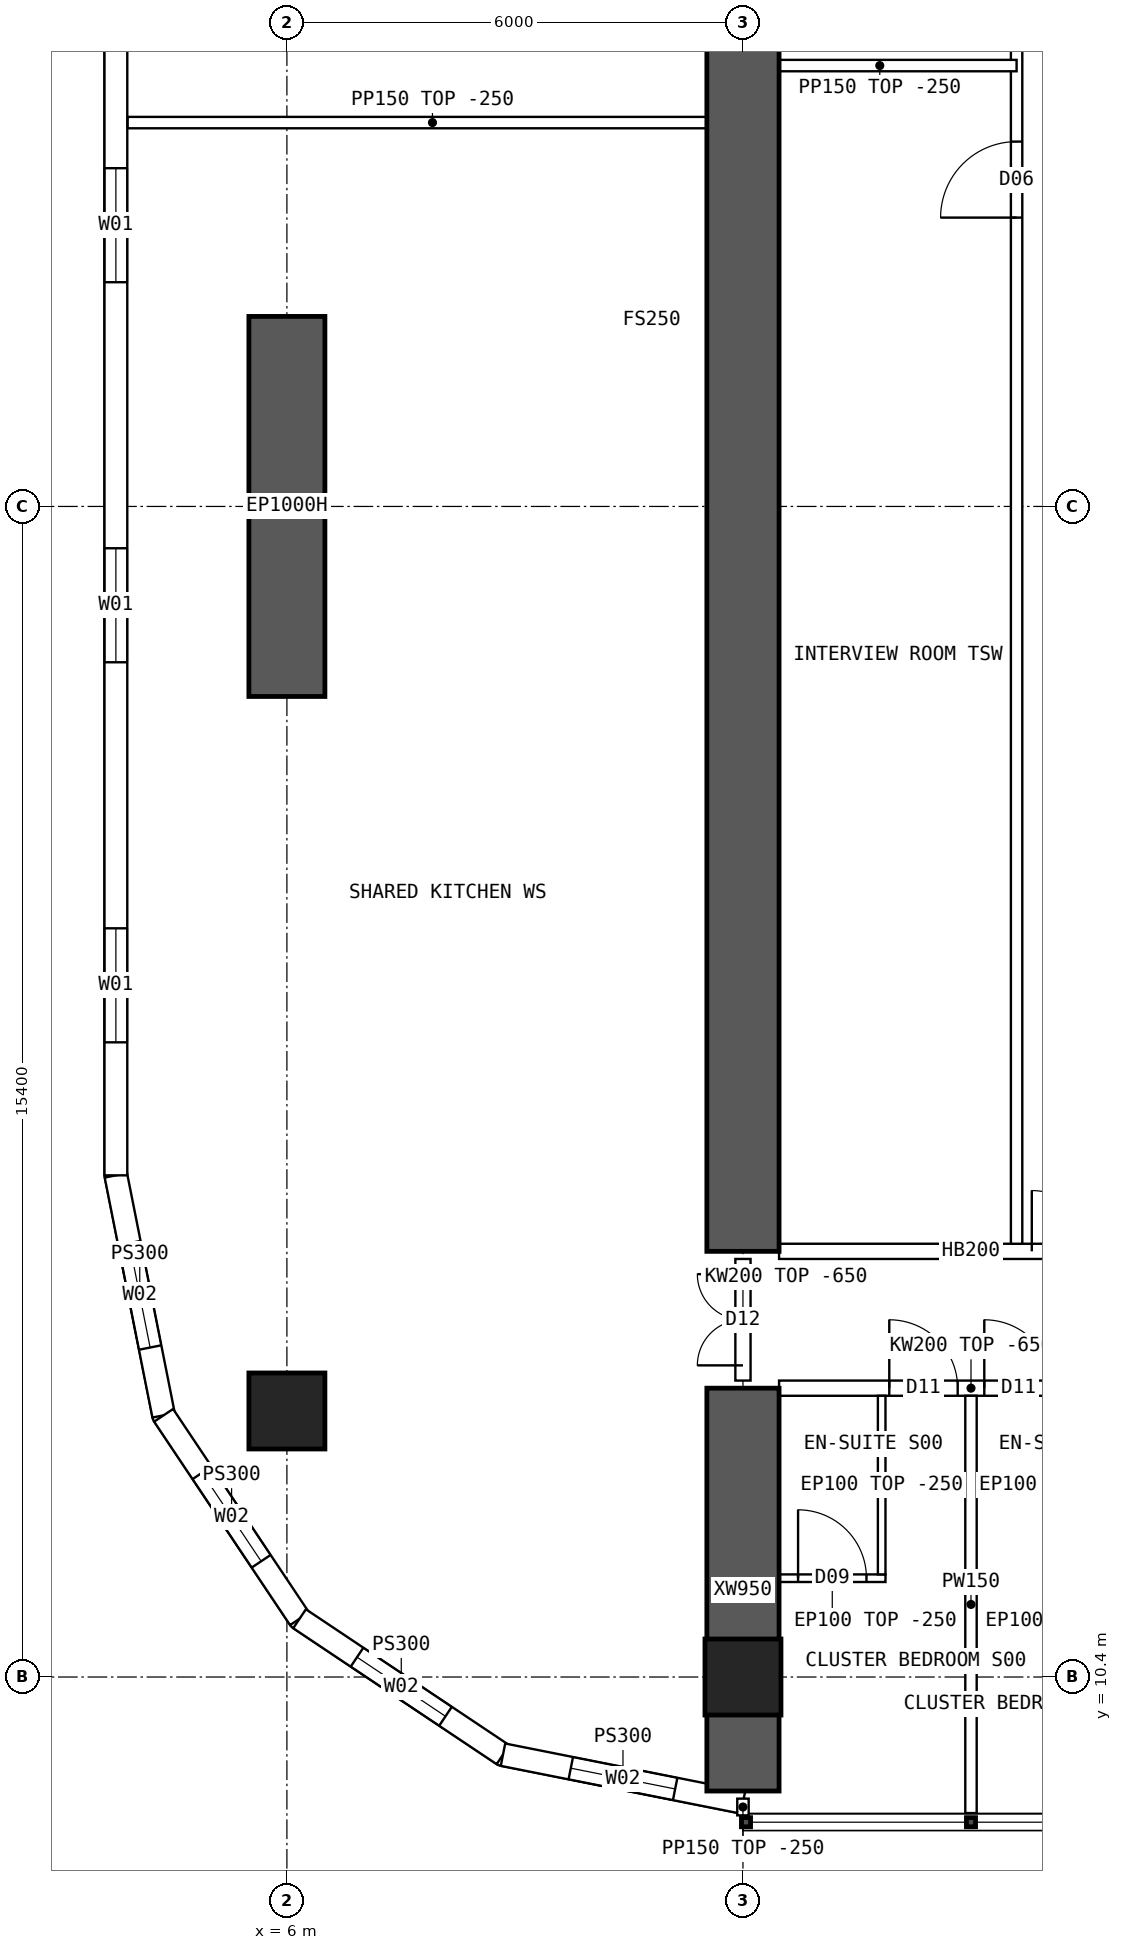
"""IFC4 building model, lengths in metres.
Left out: names, types, materials, properties, quantities, classifications, styles, units other than length and angle.
Written with IfcOpenShell. Run it as: python <this file> out.ifc"""

import sys

from ifc_helpers import new_model, si_unit, direction, frame, frame_2d, origin, origin_2d, place, context, subcontext, project, spatial, polyline, rectangle, hollow_rectangle, outline, extrude, element, fill, save


model = new_model("IFC4")
c1 = context("Model", 3, precision=1e-05, world=origin(), true_north=direction((0.0, 1.0)))
c2 = subcontext(c1, "Body", "Model", "MODEL_VIEW")
j1 = project(units=[si_unit("LENGTHUNIT", "METRE"), si_unit("PLANEANGLEUNIT", "RADIAN")], contexts=[c1])
p1 = place(None, origin())
s1 = spatial("IfcSite", under=j1, at=p1, CompositionType="ELEMENT")
p2 = place(p1, origin())
s2 = spatial("IfcBuilding", under=s1, at=p2, CompositionType="ELEMENT")
p3 = place(p2, frame((0.0, 0.0, 88.15)))
s3 = spatial("IfcBuildingStorey", under=s2, at=p3, CompositionType="ELEMENT", Elevation=88.15)
for number, where, z_axis, x_axis in (
    (1, (12.0, 10.4, 0.0), (0.0, 0.0, 1.0), (1.0, 0.0, 0.0)),
    (2, (6.0, 13.9, 0.0), (0.0, 0.0, 1.0), (1.0, 0.0, 0.0)),
):
    element("IfcColumn", number, at=place(p3, frame(where, z_axis=z_axis, x_axis=x_axis)), inside=s3, PredefinedType="COLUMN", context=c2, shape_type="SweptSolid", body=[
        extrude(hollow_rectangle(XDim=1.0, YDim=1.0, WallThickness=0.1, at=origin_2d()), origin(), (0.0, 0.0, 1.0), 3.75),
    ])
p4 = place(p3, frame((6.0, 23.3, 0.0), z_axis=(0.0, 0.0, 1.0), x_axis=(0.0, 1.0, 0.0)))
e3 = element("IfcWall", 3, at=p4, inside=s3, PredefinedType="SHEAR", context=c2, shape_type="SweptSolid", body=[
    extrude(rectangle(XDim=5.0, YDim=1.0, at=frame_2d((2.5, 0.0))), origin(), (0.0, 0.0, 1.0), 3.75),
])
p5 = place(p3, frame((12.0, 8.9, 0.0), z_axis=(0.0, 0.0, 1.0), x_axis=(0.0, 1.0, 0.0)))
e4 = element("IfcWall", 4, at=p5, inside=s3, PredefinedType="SHEAR", context=c2, shape_type="SweptSolid", body=[
    extrude(rectangle(XDim=5.3, YDim=0.95, at=frame_2d((2.65, 0.0))), origin(), (0.0, 0.0, 1.0), 3.75),
])
p6 = place(p3, frame((12.0, 16.0, 0.0), z_axis=(0.0, 0.0, 1.0), x_axis=(0.0, 1.0, 0.0)))
e5 = element("IfcWall", 5, at=p6, inside=s3, PredefinedType="SHEAR", context=c2, shape_type="SweptSolid", body=[
    extrude(rectangle(XDim=32.0, YDim=0.95, at=frame_2d((16.0, 0.0))), origin(), (0.0, 0.0, 1.0), 3.75),
])
p7 = place(p3, frame((3.75, 47.0, 0.0), z_axis=(0.0, 0.0, 1.0), x_axis=(0.0, -1.0, 0.0)))
e6 = element("IfcWall", 6, at=p7, inside=s3, PredefinedType="SOLIDWALL", context=c2, shape_type="SweptSolid", body=[
    extrude(outline(polyline([(-0.015, -0.15), (30.015, -0.15), (29.985, 0.15), (0.015, 0.15), (-0.015, -0.15)])), origin(), (0.0, 0.0, 1.0), 3.5),
])
p8 = place(p7, frame((1.75, 0.0, 0.9)))
e7 = element("IfcOpeningElement", 7, at=p8, cuts=e6, PredefinedType="OPENING", context=c2, shape_type="SweptSolid", body=[
    extrude(rectangle(XDim=1.5, YDim=2.0, at=frame_2d((0.75, 1.0))), frame((0.0, 0.16, 0.0), z_axis=(0.0, -1.0, 0.0), x_axis=(1.0, 0.0, 0.0)), (0.0, 0.0, 1.0), 0.32),
])
p9 = place(p7, frame((6.75, 0.0, 0.9)))
e8 = element("IfcOpeningElement", 8, at=p9, cuts=e6, PredefinedType="OPENING", context=c2, shape_type="SweptSolid", body=[
    extrude(rectangle(XDim=1.5, YDim=2.0, at=frame_2d((0.75, 1.0))), frame((0.0, 0.16, 0.0), z_axis=(0.0, -1.0, 0.0), x_axis=(1.0, 0.0, 0.0)), (0.0, 0.0, 1.0), 0.32),
])
p10 = place(p7, frame((11.75, 0.0, 0.9)))
e9 = element("IfcOpeningElement", 9, at=p10, cuts=e6, PredefinedType="OPENING", context=c2, shape_type="SweptSolid", body=[
    extrude(rectangle(XDim=1.5, YDim=2.0, at=frame_2d((0.75, 1.0))), frame((0.0, 0.16, 0.0), z_axis=(0.0, -1.0, 0.0), x_axis=(1.0, 0.0, 0.0)), (0.0, 0.0, 1.0), 0.32),
])
p11 = place(p7, frame((16.75, 0.0, 0.9)))
e10 = element("IfcOpeningElement", 10, at=p11, cuts=e6, PredefinedType="OPENING", context=c2, shape_type="SweptSolid", body=[
    extrude(rectangle(XDim=1.5, YDim=2.0, at=frame_2d((0.75, 1.0))), frame((0.0, 0.16, 0.0), z_axis=(0.0, -1.0, 0.0), x_axis=(1.0, 0.0, 0.0)), (0.0, 0.0, 1.0), 0.32),
])
p12 = place(p7, frame((21.75, 0.0, 0.9)))
e11 = element("IfcOpeningElement", 11, at=p12, cuts=e6, PredefinedType="OPENING", context=c2, shape_type="SweptSolid", body=[
    extrude(rectangle(XDim=1.5, YDim=2.0, at=frame_2d((0.75, 1.0))), frame((0.0, 0.16, 0.0), z_axis=(0.0, -1.0, 0.0), x_axis=(1.0, 0.0, 0.0)), (0.0, 0.0, 1.0), 0.32),
])
p13 = place(p7, frame((26.75, 0.0, 0.9)))
e12 = element("IfcOpeningElement", 12, at=p13, cuts=e6, PredefinedType="OPENING", context=c2, shape_type="SweptSolid", body=[
    extrude(rectangle(XDim=1.5, YDim=2.0, at=frame_2d((0.75, 1.0))), frame((0.0, 0.16, 0.0), z_axis=(0.0, -1.0, 0.0), x_axis=(1.0, 0.0, 0.0)), (0.0, 0.0, 1.0), 0.32),
])
p14 = place(p3, frame((3.75, 17.0, 0.0), z_axis=(0.0, 0.0, 1.0), x_axis=(0.195080412259, -0.980787251524, 0.0)))
e13 = element("IfcWall", 13, at=p14, inside=s3, PredefinedType="SOLIDWALL", context=c2, shape_type="SweptSolid", body=[
    extrude(outline(polyline([(-0.015, -0.15), (3.249, -0.15), (3.189, 0.15), (0.015, 0.15), (-0.015, -0.15)])), origin(), (0.0, 0.0, 1.0), 3.5),
])
p15 = place(p14, frame((0.909, 0.0, 0.9)))
e14 = element("IfcOpeningElement", 14, at=p15, cuts=e13, PredefinedType="OPENING", context=c2, shape_type="SweptSolid", body=[
    extrude(rectangle(XDim=1.4, YDim=1.8, at=frame_2d((0.7, 0.9))), frame((0.0, 0.16, 0.0), z_axis=(0.0, -1.0, 0.0), x_axis=(1.0, 0.0, 0.0)), (0.0, 0.0, 1.0), 0.32),
])
p16 = place(p3, frame((4.378, 13.843, 0.0), z_axis=(0.0, 0.0, 1.0), x_axis=(0.555609954424, -0.831443069936, 0.0)))
e15 = element("IfcWall", 15, at=p16, inside=s3, PredefinedType="SOLIDWALL", context=c2, shape_type="SweptSolid", body=[
    extrude(outline(polyline([(-0.03, -0.15), (3.249, -0.15), (3.189, 0.15), (0.03, 0.15), (-0.03, -0.15)])), origin(), (0.0, 0.0, 1.0), 3.5),
])
p17 = place(p16, frame((0.909, 0.0, 0.9)))
e16 = element("IfcOpeningElement", 16, at=p17, cuts=e15, PredefinedType="OPENING", context=c2, shape_type="SweptSolid", body=[
    extrude(rectangle(XDim=1.4, YDim=1.8, at=frame_2d((0.7, 0.9))), frame((0.0, 0.16, 0.0), z_axis=(0.0, -1.0, 0.0), x_axis=(1.0, 0.0, 0.0)), (0.0, 0.0, 1.0), 0.32),
])
p18 = place(p3, frame((6.167, 11.167, 0.0), z_axis=(0.0, 0.0, 1.0), x_axis=(0.831443069936, -0.555609954424, 0.0)))
e17 = element("IfcWall", 17, at=p18, inside=s3, PredefinedType="SOLIDWALL", context=c2, shape_type="SweptSolid", body=[
    extrude(outline(polyline([(-0.03, -0.15), (3.249, -0.15), (3.189, 0.15), (0.03, 0.15), (-0.03, -0.15)])), origin(), (0.0, 0.0, 1.0), 3.5),
])
p19 = place(p18, frame((0.909, 0.0, 0.9)))
e18 = element("IfcOpeningElement", 18, at=p19, cuts=e17, PredefinedType="OPENING", context=c2, shape_type="SweptSolid", body=[
    extrude(rectangle(XDim=1.4, YDim=1.8, at=frame_2d((0.7, 0.9))), frame((0.0, 0.16, 0.0), z_axis=(0.0, -1.0, 0.0), x_axis=(1.0, 0.0, 0.0)), (0.0, 0.0, 1.0), 0.32),
])
p20 = place(p3, frame((8.843, 9.378, 0.0), z_axis=(0.0, 0.0, 1.0), x_axis=(0.980787251524, -0.195080412259, 0.0)))
e19 = element("IfcWall", 19, at=p20, inside=s3, PredefinedType="SOLIDWALL", context=c2, shape_type="SweptSolid", body=[
    extrude(outline(polyline([(-0.03, -0.15), (3.249, -0.15), (3.189, 0.15), (0.03, 0.15), (-0.03, -0.15)])), origin(), (0.0, 0.0, 1.0), 3.5),
])
p21 = place(p20, frame((0.909, 0.0, 0.9)))
e20 = element("IfcOpeningElement", 20, at=p21, cuts=e19, PredefinedType="OPENING", context=c2, shape_type="SweptSolid", body=[
    extrude(rectangle(XDim=1.4, YDim=1.8, at=frame_2d((0.7, 0.9))), frame((0.0, 0.16, 0.0), z_axis=(0.0, -1.0, 0.0), x_axis=(1.0, 0.0, 0.0)), (0.0, 0.0, 1.0), 0.32),
])
p22 = place(p3, frame((12.475, 14.2, 0.0), z_axis=(0.0, 0.0, 1.0), x_axis=(1.0, 0.0, 0.0)))
e21 = element("IfcWall", 21, at=p22, inside=s3, PredefinedType="SOLIDWALL", context=c2, shape_type="SweptSolid", body=[
    extrude(outline(polyline([(0.0, 0.0), (5.05, 0.0), (5.05, 3.1), (0.0, 3.1), (0.0, 0.0)])), frame((0.0, 0.1, 0.0), z_axis=(0.0, -1.0, 0.0), x_axis=(1.0, 0.0, 0.0)), (0.0, 0.0, 1.0), 0.2),
])
p23 = place(p22, frame((1.45, 0.0, 0.0)))
e22 = element("IfcOpeningElement", 22, at=p23, cuts=e21, PredefinedType="OPENING", context=c2, shape_type="SweptSolid", body=[
    extrude(rectangle(XDim=0.9, YDim=2.1, at=frame_2d((0.45, 1.05))), frame((0.0, 0.11, 0.0), z_axis=(0.0, -1.0, 0.0), x_axis=(1.0, 0.0, 0.0)), (0.0, 0.0, 1.0), 0.22),
])
p24 = place(p22, frame((2.7, 0.0, 0.0)))
e23 = element("IfcOpeningElement", 23, at=p24, cuts=e21, PredefinedType="OPENING", context=c2, shape_type="SweptSolid", body=[
    extrude(rectangle(XDim=0.9, YDim=2.1, at=frame_2d((0.45, 1.05))), frame((0.0, 0.11, 0.0), z_axis=(0.0, -1.0, 0.0), x_axis=(1.0, 0.0, 0.0)), (0.0, 0.0, 1.0), 0.22),
])
p25 = place(p3, frame((12.475, 16.0, 0.0), z_axis=(0.0, 0.0, 1.0), x_axis=(1.0, 0.0, 0.0)))
e24 = element("IfcWall", 24, at=p25, inside=s3, PredefinedType="SOLIDWALL", context=c2, shape_type="SweptSolid", body=[
    extrude(rectangle(XDim=5.05, YDim=0.2, at=frame_2d((2.525, 0.0))), origin(), (0.0, 0.0, 1.0), 3.5),
])
p26 = place(p25, frame((3.325, 0.0, 0.0)))
e25 = element("IfcOpeningElement", 25, at=p26, cuts=e24, PredefinedType="OPENING", context=c2, shape_type="SweptSolid", body=[
    extrude(rectangle(XDim=1.6, YDim=2.1, at=frame_2d((0.8, 1.05))), frame((0.0, 0.11, 0.0), z_axis=(0.0, -1.0, 0.0), x_axis=(1.0, 0.0, 0.0)), (0.0, 0.0, 1.0), 0.22),
])
p27 = place(p3, frame((15.0, 8.61, 0.0), z_axis=(0.0, 0.0, 1.0), x_axis=(0.0, 1.0, 0.0)))
e26 = element("IfcWall", 26, at=p27, inside=s3, PredefinedType="PARTITIONING", context=c2, shape_type="SweptSolid", body=[
    extrude(outline(polyline([(0.0, 0.0), (5.49, 0.0), (5.49, 3.1), (5.442, 3.1), (5.44, 3.5), (1.992, 3.5), (1.99, 3.1), (1.592, 3.1), (1.59, 3.5), (0.0, 3.5), (0.0, 0.0)])), frame((0.0, 0.075, 0.0), z_axis=(0.0, -1.0, 0.0), x_axis=(1.0, 0.0, 0.0)), (0.0, 0.0, 1.0), 0.15),
])
p28 = place(p3, frame((13.875, 11.7, 0.0), z_axis=(0.0, 0.0, 1.0), x_axis=(-1.0, 0.0, 0.0)))
e27 = element("IfcWall", 27, at=p28, inside=s3, PredefinedType="PARTITIONING", context=c2, shape_type="SweptSolid", body=[
    extrude(rectangle(XDim=1.4, YDim=0.1, at=frame_2d((0.7, 0.0))), origin(), (0.0, 0.0, 1.0), 3.5),
])
p29 = place(p28, frame((0.25, 0.0, 0.0)))
e28 = element("IfcOpeningElement", 28, at=p29, cuts=e27, PredefinedType="OPENING", context=c2, shape_type="SweptSolid", body=[
    extrude(rectangle(XDim=0.9, YDim=2.1, at=frame_2d((0.45, 1.05))), frame((0.0, 0.06, 0.0), z_axis=(0.0, -1.0, 0.0), x_axis=(1.0, 0.0, 0.0)), (0.0, 0.0, 1.0), 0.12),
])
p30 = place(p3, frame((13.825, 11.75, 0.0), z_axis=(0.0, 0.0, 1.0), x_axis=(0.0, 1.0, 0.0)))
e29 = element("IfcWall", 29, at=p30, inside=s3, PredefinedType="PARTITIONING", context=c2, shape_type="SweptSolid", body=[
    extrude(outline(polyline([(0.0, 0.0), (2.35, 0.0), (2.35, 3.1), (2.302, 3.1), (2.3, 3.5), (0.0, 3.5), (0.0, 0.0)])), frame((0.0, 0.05, 0.0), z_axis=(0.0, -1.0, 0.0), x_axis=(1.0, 0.0, 0.0)), (0.0, 0.0, 1.0), 0.1),
])
p31 = place(p3, frame((15.6, 16.1, 0.0), z_axis=(0.0, 0.0, 1.0), x_axis=(0.0, 1.0, 0.0)))
e30 = element("IfcWall", 30, at=p31, inside=s3, PredefinedType="PARTITIONING", context=c2, shape_type="SweptSolid", body=[
    extrude(rectangle(XDim=31.8, YDim=0.15, at=frame_2d((15.9, 0.0))), origin(), (0.0, 0.0, 1.0), 3.5),
])
p32 = place(p31, frame((13.5, 0.0, 0.0)))
e31 = element("IfcOpeningElement", 31, at=p32, cuts=e30, PredefinedType="OPENING", context=c2, shape_type="SweptSolid", body=[
    extrude(rectangle(XDim=1.0, YDim=2.1, at=frame_2d((0.5, 1.05))), frame((0.0, 0.085, 0.0), z_axis=(0.0, -1.0, 0.0), x_axis=(1.0, 0.0, 0.0)), (0.0, 0.0, 1.0), 0.17),
])
p33 = place(p31, frame((16.5, 0.0, 0.0)))
e32 = element("IfcOpeningElement", 32, at=p33, cuts=e30, PredefinedType="OPENING", context=c2, shape_type="SweptSolid", body=[
    extrude(rectangle(XDim=1.0, YDim=2.1, at=frame_2d((0.5, 1.05))), frame((0.0, 0.085, 0.0), z_axis=(0.0, -1.0, 0.0), x_axis=(1.0, 0.0, 0.0)), (0.0, 0.0, 1.0), 0.17),
])
p34 = place(p3, frame((12.0, 31.6, 0.0), z_axis=(0.0, 0.0, 1.0), x_axis=(1.0, 0.0, 0.0)))
e33 = element("IfcWall", 33, at=p34, inside=s3, PredefinedType="PARTITIONING", context=c2, shape_type="SweptSolid", body=[
    extrude(rectangle(XDim=3.6, YDim=0.15, at=frame_2d((1.8, 0.0))), origin(), (0.0, 0.0, 1.0), 3.5),
])
p35 = place(p3, frame((3.905, 30.85, 0.0), z_axis=(0.0, 0.0, 1.0), x_axis=(1.0, 0.0, 0.0)))
e34 = element("IfcWall", 34, at=p35, inside=s3, PredefinedType="PARTITIONING", context=c2, shape_type="SweptSolid", body=[
    extrude(outline(polyline([(0.0, 0.0), (8.02, 0.0), (8.02, 3.5), (2.397, 3.5), (2.395, 3.05), (1.797, 3.05), (1.795, 3.5), (0.0, 3.5), (0.0, 0.0)])), frame((0.0, 0.075, 0.0), z_axis=(0.0, -1.0, 0.0), x_axis=(1.0, 0.0, 0.0)), (0.0, 0.0, 1.0), 0.15),
])
p36 = place(p3, frame((12.0, 14.3, 0.0), z_axis=(0.0, 0.0, 1.0), x_axis=(0.0, 1.0, 0.0)))
e35 = element("IfcWall", 35, at=p36, inside=s3, PredefinedType="SOLIDWALL", context=c2, shape_type="SweptSolid", body=[
    extrude(outline(polyline([(0.0, 0.0), (1.6, 0.0), (1.6, 3.1), (0.0, 3.1), (0.0, 0.0)])), frame((0.0, 0.1, 0.0), z_axis=(0.0, -1.0, 0.0), x_axis=(1.0, 0.0, 0.0)), (0.0, 0.0, 1.0), 0.2),
])
p37 = place(p36, frame((0.2, 0.0, 0.0)))
e36 = element("IfcOpeningElement", 36, at=p37, cuts=e35, PredefinedType="OPENING", context=c2, shape_type="SweptSolid", body=[
    extrude(rectangle(XDim=1.2, YDim=2.1, at=frame_2d((0.6, 1.05))), frame((0.0, 0.11, 0.0), z_axis=(0.0, -1.0, 0.0), x_axis=(1.0, 0.0, 0.0)), (0.0, 0.0, 1.0), 0.22),
])
p38 = place(p3, frame((12.0, 8.8, 0.0), z_axis=(0.0, 0.0, 1.0), x_axis=(0.0, -1.0, 0.0)))
e37 = element("IfcWall", 37, at=p38, inside=s3, PredefinedType="PARTITIONING", context=c2, shape_type="SweptSolid", body=[
    extrude(rectangle(XDim=0.22, YDim=0.15, at=frame_2d((0.11, 0.0))), origin(), (0.0, 0.0, 1.0), 3.5),
])
p39 = place(p11, origin())
e38 = element("IfcWindow", 38, at=p39, inside=s3, PartitioningType="SINGLE_PANEL", PredefinedType="WINDOW", context=c2, shape_type="SweptSolid", body=[
    extrude(rectangle(XDim=1.5, YDim=2.0, at=frame_2d((0.75, 1.0))), frame((0.0, 0.03, 0.0), z_axis=(0.0, -1.0, 0.0), x_axis=(1.0, 0.0, 0.0)), (0.0, 0.0, 1.0), 0.06),
])
fill(e10, e38)
p40 = place(p12, origin())
e39 = element("IfcWindow", 39, at=p40, inside=s3, PartitioningType="SINGLE_PANEL", PredefinedType="WINDOW", context=c2, shape_type="SweptSolid", body=[
    extrude(rectangle(XDim=1.5, YDim=2.0, at=frame_2d((0.75, 1.0))), frame((0.0, 0.03, 0.0), z_axis=(0.0, -1.0, 0.0), x_axis=(1.0, 0.0, 0.0)), (0.0, 0.0, 1.0), 0.06),
])
fill(e11, e39)
p41 = place(p13, origin())
e40 = element("IfcWindow", 40, at=p41, inside=s3, PartitioningType="SINGLE_PANEL", PredefinedType="WINDOW", context=c2, shape_type="SweptSolid", body=[
    extrude(rectangle(XDim=1.5, YDim=2.0, at=frame_2d((0.75, 1.0))), frame((0.0, 0.03, 0.0), z_axis=(0.0, -1.0, 0.0), x_axis=(1.0, 0.0, 0.0)), (0.0, 0.0, 1.0), 0.06),
])
fill(e12, e40)
p42 = place(p15, origin())
e41 = element("IfcWindow", 41, at=p42, inside=s3, PartitioningType="SINGLE_PANEL", PredefinedType="WINDOW", context=c2, shape_type="SweptSolid", body=[
    extrude(rectangle(XDim=1.4, YDim=1.8, at=frame_2d((0.7, 0.9))), frame((0.0, 0.03, 0.0), z_axis=(0.0, -1.0, 0.0), x_axis=(1.0, 0.0, 0.0)), (0.0, 0.0, 1.0), 0.06),
])
fill(e14, e41)
p43 = place(p17, origin())
e42 = element("IfcWindow", 42, at=p43, inside=s3, PartitioningType="SINGLE_PANEL", PredefinedType="WINDOW", context=c2, shape_type="SweptSolid", body=[
    extrude(rectangle(XDim=1.4, YDim=1.8, at=frame_2d((0.7, 0.9))), frame((0.0, 0.03, 0.0), z_axis=(0.0, -1.0, 0.0), x_axis=(1.0, 0.0, 0.0)), (0.0, 0.0, 1.0), 0.06),
])
fill(e16, e42)
p44 = place(p19, origin())
e43 = element("IfcWindow", 43, at=p44, inside=s3, PartitioningType="SINGLE_PANEL", PredefinedType="WINDOW", context=c2, shape_type="SweptSolid", body=[
    extrude(rectangle(XDim=1.4, YDim=1.8, at=frame_2d((0.7, 0.9))), frame((0.0, 0.03, 0.0), z_axis=(0.0, -1.0, 0.0), x_axis=(1.0, 0.0, 0.0)), (0.0, 0.0, 1.0), 0.06),
])
fill(e18, e43)
p45 = place(p21, origin())
e44 = element("IfcWindow", 44, at=p45, inside=s3, PartitioningType="SINGLE_PANEL", PredefinedType="WINDOW", context=c2, shape_type="SweptSolid", body=[
    extrude(rectangle(XDim=1.4, YDim=1.8, at=frame_2d((0.7, 0.9))), frame((0.0, 0.03, 0.0), z_axis=(0.0, -1.0, 0.0), x_axis=(1.0, 0.0, 0.0)), (0.0, 0.0, 1.0), 0.06),
])
fill(e20, e44)
p46 = place(p26, origin())
e45 = element("IfcDoor", 45, at=p46, inside=s3, OperationType="DOUBLE_DOOR_SINGLE_SWING", PredefinedType="DOOR", context=c2, shape_type="SweptSolid", body=[
    extrude(rectangle(XDim=1.6, YDim=2.1, at=frame_2d((0.8, 1.05))), frame((0.0, 0.025, 0.0), z_axis=(0.0, -1.0, 0.0), x_axis=(1.0, 0.0, 0.0)), (0.0, 0.0, 1.0), 0.05),
])
fill(e25, e45)
p47 = place(p29, origin())
e46 = element("IfcDoor", 46, at=p47, inside=s3, OperationType="SINGLE_SWING_RIGHT", PredefinedType="DOOR", context=c2, shape_type="SweptSolid", body=[
    extrude(rectangle(XDim=0.9, YDim=2.1, at=frame_2d((0.45, 1.05))), frame((0.0, 0.025, 0.0), z_axis=(0.0, -1.0, 0.0), x_axis=(1.0, 0.0, 0.0)), (0.0, 0.0, 1.0), 0.05),
])
fill(e28, e46)
p48 = place(p23, origin())
e47 = element("IfcDoor", 47, at=p48, inside=s3, OperationType="SINGLE_SWING_LEFT", PredefinedType="DOOR", context=c2, shape_type="SweptSolid", body=[
    extrude(rectangle(XDim=0.9, YDim=2.1, at=frame_2d((0.45, 1.05))), frame((0.0, 0.025, 0.0), z_axis=(0.0, -1.0, 0.0), x_axis=(1.0, 0.0, 0.0)), (0.0, 0.0, 1.0), 0.05),
])
fill(e22, e47)
p49 = place(p24, origin())
e48 = element("IfcDoor", 48, at=p49, inside=s3, OperationType="SINGLE_SWING_LEFT", PredefinedType="DOOR", context=c2, shape_type="SweptSolid", body=[
    extrude(rectangle(XDim=0.9, YDim=2.1, at=frame_2d((0.45, 1.05))), frame((0.0, 0.025, 0.0), z_axis=(0.0, -1.0, 0.0), x_axis=(1.0, 0.0, 0.0)), (0.0, 0.0, 1.0), 0.05),
])
fill(e23, e48)
p50 = place(p32, origin())
e49 = element("IfcDoor", 49, at=p50, inside=s3, OperationType="SINGLE_SWING_LEFT", PredefinedType="DOOR", context=c2, shape_type="SweptSolid", body=[
    extrude(rectangle(XDim=1.0, YDim=2.1, at=frame_2d((0.5, 1.05))), frame((0.0, 0.025, 0.0), z_axis=(0.0, -1.0, 0.0), x_axis=(1.0, 0.0, 0.0)), (0.0, 0.0, 1.0), 0.05),
])
fill(e31, e49)
p51 = place(p37, origin())
e50 = element("IfcDoor", 50, at=p51, inside=s3, OperationType="DOUBLE_DOOR_SINGLE_SWING", PredefinedType="DOOR", context=c2, shape_type="SweptSolid", body=[
    extrude(rectangle(XDim=1.2, YDim=2.1, at=frame_2d((0.6, 1.05))), frame((0.0, 0.025, 0.0), z_axis=(0.0, -1.0, 0.0), x_axis=(1.0, 0.0, 0.0)), (0.0, 0.0, 1.0), 0.05),
])
fill(e36, e50)
save(model, sys.argv[1])
